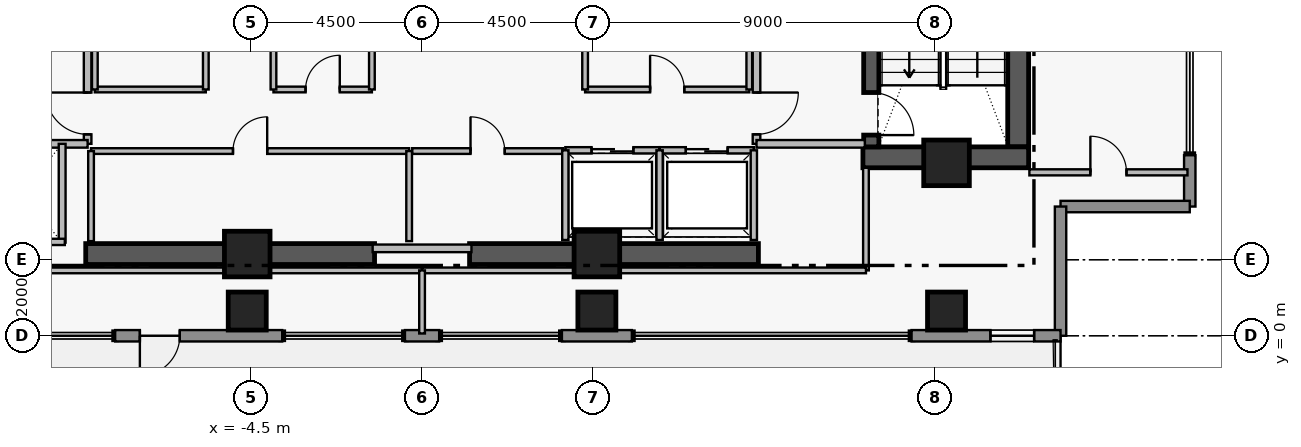
"""IFC4 building model, lengths in metres.
Left out: names, types, materials, properties, quantities, classifications, styles, units other than length and angle.
Written with IfcOpenShell. Run it as: python <this file> out.ifc"""

import sys

from ifc_helpers import new_model, si_unit, direction, frame, frame_2d, origin, origin_2d, place, context, subcontext, project, spatial, rectangle, extrude, element, fill, save


model = new_model("IFC4")
c1 = context("Model", 3, precision=1e-05, world=origin(), true_north=direction((0.0, 1.0)))
c2 = subcontext(c1, "Body", "Model", "MODEL_VIEW")
j1 = project(units=[si_unit("LENGTHUNIT", "METRE"), si_unit("PLANEANGLEUNIT", "RADIAN")], contexts=[c1])
p1 = place(None, origin())
s1 = spatial("IfcSite", under=j1, at=p1, CompositionType="ELEMENT")
p2 = place(p1, origin())
s2 = spatial("IfcBuilding", under=s1, at=p2, CompositionType="ELEMENT")
p3 = place(p2, frame((0.0, 0.0, 243.35)))
s3 = spatial("IfcBuildingStorey", under=s2, at=p3, CompositionType="ELEMENT", Elevation=243.35)
p4 = place(p3, frame((15.685, 4.97, 0.0), z_axis=(0.0, 0.0, 1.0), x_axis=(0.0, 1.0, 0.0)))
e1 = element("IfcWall", 1, at=p4, inside=s3, PredefinedType="SHEAR", context=c2, shape_type="SweptSolid", body=[
    extrude(rectangle(XDim=8.96, YDim=0.55, at=frame_2d((4.48, 0.0))), origin(), (0.0, 0.0, 1.0), 3.51),
])
p5 = place(p3, frame((11.6, 4.695, 0.0), z_axis=(0.0, 0.0, 1.0), x_axis=(1.0, 0.0, 0.0)))
e2 = element("IfcWall", 2, at=p5, inside=s3, PredefinedType="SHEAR", context=c2, shape_type="SweptSolid", body=[
    extrude(rectangle(XDim=4.36, YDim=0.55, at=frame_2d((2.18, 0.0))), origin(), (0.0, 0.0, 1.0), 3.51),
])
for number, where, z_axis, x_axis in (
    (3, (-8.85, 2.15, 0.0), (0.0, 0.0, 1.0), (1.0, 0.0, 0.0)),
    (4, (1.25, 2.15, 0.0), (0.0, 0.0, 1.0), (1.0, 0.0, 0.0)),
):
    element("IfcWall", number, at=place(p3, frame(where, z_axis=z_axis, x_axis=x_axis)), inside=s3, PredefinedType="SHEAR", context=c2, shape_type="SweptSolid", body=[
        extrude(rectangle(XDim=7.6, YDim=0.55, at=frame_2d((3.8, 0.0))), origin(), (0.0, 0.0, 1.0), 3.48),
    ])
p6 = place(p3, frame((11.82, 13.93, 0.0), z_axis=(0.0, 0.0, 1.0), x_axis=(0.0, -1.0, 0.0)))
e5 = element("IfcWall", 5, at=p6, inside=s3, PredefinedType="SHEAR", context=c2, shape_type="SweptSolid", body=[
    extrude(rectangle(XDim=8.96, YDim=0.4, at=frame_2d((4.48, 0.0))), origin(), (0.0, 0.0, 1.0), 3.51),
])
p7 = place(p6, frame((7.53, 0.0, 0.0)))
e6 = element("IfcOpeningElement", 6, at=p7, cuts=e5, PredefinedType="OPENING", context=c2, shape_type="SweptSolid", body=[
    extrude(rectangle(XDim=1.12, YDim=2.22, at=frame_2d((0.56, 1.11))), frame((0.0, 0.21, 0.0), z_axis=(0.0, -1.0, 0.0), x_axis=(1.0, 0.0, 0.0)), (0.0, 0.0, 1.0), 0.42),
])
for number, where, z_axis, x_axis in (
    (7, (-4.6, 2.15, 0.0), (0.0, 0.0, 1.0), (1.0, 0.0, 0.0)),
    (8, (4.6, 2.15, 0.0), (0.0, 0.0, 1.0), (1.0, 0.0, 0.0)),
    (9, (13.8, 4.55, 0.0), (0.0, 0.0, 1.0), (1.0, 0.0, 0.0)),
):
    element("IfcColumn", number, at=place(p3, frame(where, z_axis=z_axis, x_axis=x_axis)), inside=s3, PredefinedType="COLUMN", context=c2, shape_type="SweptSolid", body=[
        extrude(rectangle(XDim=1.2, YDim=1.2, at=origin_2d()), origin(), (0.0, 0.0, 1.0), 3.7),
    ])
for number, where, z_axis, x_axis in (
    (10, (-4.6, 0.65, 0.0), (0.0, 0.0, 1.0), (1.0, 0.0, 0.0)),
    (11, (4.6, 0.65, 0.0), (0.0, 0.0, 1.0), (1.0, 0.0, 0.0)),
    (12, (13.8, 0.65, 0.0), (0.0, 0.0, 1.0), (1.0, 0.0, 0.0)),
):
    element("IfcColumn", number, at=place(p3, frame(where, z_axis=z_axis, x_axis=x_axis)), inside=s3, PredefinedType="COLUMN", context=c2, shape_type="SweptSolid", body=[
        extrude(rectangle(XDim=1.0, YDim=1.0, at=origin_2d()), origin(), (0.0, 0.0, 1.0), 3.7),
    ])
p8 = place(p3, frame((20.2, 4.75, 0.0), z_axis=(0.0, 0.0, 1.0), x_axis=(0.0, -1.0, 0.0)))
e13 = element("IfcWall", 13, at=p8, inside=s3, PredefinedType="STANDARD", context=c2, shape_type="SweptSolid", body=[
    extrude(rectangle(XDim=1.35, YDim=0.3, at=frame_2d((0.675, 0.0))), origin(), (0.0, 0.0, 1.0), 3.48),
])
for number, where, z_axis, x_axis in (
    (14, (20.2, 3.4, 0.0), (0.0, 0.0, 1.0), (-1.0, 0.0, 0.0)),
    (15, (16.8, 3.4, 0.0), (0.0, 0.0, 1.0), (0.0, -1.0, 0.0)),
):
    element("IfcWall", number, at=place(p3, frame(where, z_axis=z_axis, x_axis=x_axis)), inside=s3, PredefinedType="STANDARD", context=c2, shape_type="SweptSolid", body=[
        extrude(rectangle(XDim=3.4, YDim=0.3, at=frame_2d((1.7, 0.0))), origin(), (0.0, 0.0, 1.0), 3.48),
    ])
p9 = place(p3, frame((16.8, 0.0, 0.0), z_axis=(0.0, 0.0, 1.0), x_axis=(-1.0, 0.0, 0.0)))
e16 = element("IfcWall", 16, at=p9, inside=s3, PredefinedType="STANDARD", context=c2, shape_type="SweptSolid", body=[
    extrude(rectangle(XDim=3.92, YDim=0.3, at=frame_2d((1.96, 0.0))), origin(), (0.0, 0.0, 1.0), 3.48),
])
p10 = place(p9, frame((0.695, 0.0, 0.95)))
e17 = element("IfcOpeningElement", 17, at=p10, cuts=e16, PredefinedType="OPENING", context=c2, shape_type="SweptSolid", body=[
    extrude(rectangle(XDim=1.15, YDim=1.55, at=frame_2d((0.575, 0.775))), frame((0.0, 0.16, 0.0), z_axis=(0.0, -1.0, 0.0), x_axis=(1.0, 0.0, 0.0)), (0.0, 0.0, 1.0), 0.32),
])
p11 = place(p3, frame((5.52, 0.0, 0.0), z_axis=(0.0, 0.0, 1.0), x_axis=(-1.0, 0.0, 0.0)))
e18 = element("IfcWall", 18, at=p11, inside=s3, PredefinedType="STANDARD", context=c2, shape_type="SweptSolid", body=[
    extrude(rectangle(XDim=1.84, YDim=0.3, at=frame_2d((0.92, 0.0))), origin(), (0.0, 0.0, 1.0), 3.48),
])
p12 = place(p3, frame((0.45, 0.0, 0.0), z_axis=(0.0, 0.0, 1.0), x_axis=(-1.0, 0.0, 0.0)))
e19 = element("IfcWall", 19, at=p12, inside=s3, PredefinedType="STANDARD", context=c2, shape_type="SweptSolid", body=[
    extrude(rectangle(XDim=0.9, YDim=0.3, at=frame_2d((0.45, 0.0))), origin(), (0.0, 0.0, 1.0), 3.48),
])
p13 = place(p3, frame((-3.68, 0.0, 0.0), z_axis=(0.0, 0.0, 1.0), x_axis=(-1.0, 0.0, 0.0)))
e20 = element("IfcWall", 20, at=p13, inside=s3, PredefinedType="STANDARD", context=c2, shape_type="SweptSolid", body=[
    extrude(rectangle(XDim=4.395, YDim=0.3, at=frame_2d((2.198, 0.0))), origin(), (0.0, 0.0, 1.0), 3.48),
])
p14 = place(p13, frame((2.695, 0.0, 0.0)))
e21 = element("IfcOpeningElement", 21, at=p14, cuts=e20, PredefinedType="OPENING", context=c2, shape_type="SweptSolid", body=[
    extrude(rectangle(XDim=1.05, YDim=2.2, at=frame_2d((0.525, 1.1))), frame((0.0, 0.16, 0.0), z_axis=(0.0, -1.0, 0.0), x_axis=(1.0, 0.0, 0.0)), (0.0, 0.0, 1.0), 0.32),
])
p15 = place(p3, frame((-8.8, 5.05, 0.0), z_axis=(0.0, 0.0, 1.0), x_axis=(0.0, 1.0, 0.0)))
e22 = element("IfcWall", 22, at=p15, inside=s3, PredefinedType="PARTITIONING", context=c2, shape_type="SweptSolid", body=[
    extrude(rectangle(XDim=6.1, YDim=0.2, at=frame_2d((3.05, 0.0))), origin(), (0.0, 0.0, 1.0), 3.48),
])
p16 = place(p15, frame((0.25, 0.0, 0.0)))
e23 = element("IfcOpeningElement", 23, at=p16, cuts=e22, PredefinedType="OPENING", context=c2, shape_type="SweptSolid", body=[
    extrude(rectangle(XDim=1.1, YDim=2.2, at=frame_2d((0.55, 1.1))), frame((0.0, 0.11, 0.0), z_axis=(0.0, -1.0, 0.0), x_axis=(1.0, 0.0, 0.0)), (0.0, 0.0, 1.0), 0.22),
])
p17 = place(p15, frame((3.85, 0.0, 0.0)))
e24 = element("IfcOpeningElement", 24, at=p17, cuts=e22, PredefinedType="OPENING", context=c2, shape_type="SweptSolid", body=[
    extrude(rectangle(XDim=1.1, YDim=2.2, at=frame_2d((0.55, 1.1))), frame((0.0, 0.11, 0.0), z_axis=(0.0, -1.0, 0.0), x_axis=(1.0, 0.0, 0.0)), (0.0, 0.0, 1.0), 0.22),
])
p18 = place(p3, frame((8.8, 11.15, 0.0), z_axis=(0.0, 0.0, 1.0), x_axis=(0.0, -1.0, 0.0)))
e25 = element("IfcWall", 25, at=p18, inside=s3, PredefinedType="PARTITIONING", context=c2, shape_type="SweptSolid", body=[
    extrude(rectangle(XDim=6.1, YDim=0.2, at=frame_2d((3.05, 0.0))), origin(), (0.0, 0.0, 1.0), 3.48),
])
p19 = place(p18, frame((1.15, 0.0, 0.0)))
e26 = element("IfcOpeningElement", 26, at=p19, cuts=e25, PredefinedType="OPENING", context=c2, shape_type="SweptSolid", body=[
    extrude(rectangle(XDim=1.1, YDim=2.2, at=frame_2d((0.55, 1.1))), frame((0.0, 0.11, 0.0), z_axis=(0.0, -1.0, 0.0), x_axis=(1.0, 0.0, 0.0)), (0.0, 0.0, 1.0), 0.22),
])
p20 = place(p18, frame((4.75, 0.0, 0.0)))
e27 = element("IfcOpeningElement", 27, at=p20, cuts=e25, PredefinedType="OPENING", context=c2, shape_type="SweptSolid", body=[
    extrude(rectangle(XDim=1.1, YDim=2.2, at=frame_2d((0.55, 1.1))), frame((0.0, 0.11, 0.0), z_axis=(0.0, -1.0, 0.0), x_axis=(1.0, 0.0, 0.0)), (0.0, 0.0, 1.0), 0.22),
])
p21 = place(p3, frame((3.77, 4.88, 0.0), z_axis=(0.0, 0.0, 1.0), x_axis=(1.0, 0.0, 0.0)))
e28 = element("IfcWall", 28, at=p21, inside=s3, PredefinedType="PARTITIONING", context=c2, shape_type="SweptSolid", body=[
    extrude(rectangle(XDim=2.48, YDim=0.165, at=frame_2d((1.24, 0.0))), origin(), (0.0, 0.0, 1.0), 3.48),
])
p22 = place(p21, frame((0.69, 0.0, 0.0)))
e29 = element("IfcOpeningElement", 29, at=p22, cuts=e28, PredefinedType="OPENING", context=c2, shape_type="SweptSolid", body=[
    extrude(rectangle(XDim=1.1, YDim=2.25, at=frame_2d((0.55, 1.125))), frame((0.0, 0.093, 0.0), z_axis=(0.0, -1.0, 0.0), x_axis=(1.0, 0.0, 0.0)), (0.0, 0.0, 1.0), 0.185),
])
p23 = place(p3, frame((6.25, 4.88, 0.0), z_axis=(0.0, 0.0, 1.0), x_axis=(1.0, 0.0, 0.0)))
e30 = element("IfcWall", 30, at=p23, inside=s3, PredefinedType="PARTITIONING", context=c2, shape_type="SweptSolid", body=[
    extrude(rectangle(XDim=2.48, YDim=0.165, at=frame_2d((1.24, 0.0))), origin(), (0.0, 0.0, 1.0), 3.48),
])
p24 = place(p23, frame((0.69, 0.0, 0.0)))
e31 = element("IfcOpeningElement", 31, at=p24, cuts=e30, PredefinedType="OPENING", context=c2, shape_type="SweptSolid", body=[
    extrude(rectangle(XDim=1.1, YDim=2.25, at=frame_2d((0.55, 1.125))), frame((0.0, 0.093, 0.0), z_axis=(0.0, -1.0, 0.0), x_axis=(1.0, 0.0, 0.0)), (0.0, 0.0, 1.0), 0.185),
])
p25 = place(p3, frame((-8.71, 4.86, 0.0), z_axis=(0.0, 0.0, 1.0), x_axis=(1.0, 0.0, 0.0)))
e32 = element("IfcWall", 32, at=p25, inside=s3, PredefinedType="PARTITIONING", context=c2, shape_type="SweptSolid", body=[
    extrude(rectangle(XDim=8.37, YDim=0.15, at=frame_2d((4.185, 0.0))), origin(), (0.0, 0.0, 1.0), 3.48),
])
p26 = place(p25, frame((3.735, 0.0, 0.0)))
e33 = element("IfcOpeningElement", 33, at=p26, cuts=e32, PredefinedType="OPENING", context=c2, shape_type="SweptSolid", body=[
    extrude(rectangle(XDim=0.9, YDim=2.15, at=frame_2d((0.45, 1.075))), frame((0.0, 0.085, 0.0), z_axis=(0.0, -1.0, 0.0), x_axis=(1.0, 0.0, 0.0)), (0.0, 0.0, 1.0), 0.17),
])
p27 = place(p3, frame((-0.26, 4.86, 0.0), z_axis=(0.0, 0.0, 1.0), x_axis=(1.0, 0.0, 0.0)))
e34 = element("IfcWall", 34, at=p27, inside=s3, PredefinedType="PARTITIONING", context=c2, shape_type="SweptSolid", body=[
    extrude(rectangle(XDim=3.97, YDim=0.15, at=frame_2d((1.985, 0.0))), origin(), (0.0, 0.0, 1.0), 3.48),
])
p28 = place(p27, frame((1.535, 0.0, 0.0)))
e35 = element("IfcOpeningElement", 35, at=p28, cuts=e34, PredefinedType="OPENING", context=c2, shape_type="SweptSolid", body=[
    extrude(rectangle(XDim=0.9, YDim=2.15, at=frame_2d((0.45, 1.075))), frame((0.0, 0.085, 0.0), z_axis=(0.0, -1.0, 0.0), x_axis=(1.0, 0.0, 0.0)), (0.0, 0.0, 1.0), 0.17),
])
p29 = place(p3, frame((-3.91, 6.48, 0.0), z_axis=(0.0, 0.0, 1.0), x_axis=(1.0, 0.0, 0.0)))
e36 = element("IfcWall", 36, at=p29, inside=s3, PredefinedType="PARTITIONING", context=c2, shape_type="SweptSolid", body=[
    extrude(rectangle(XDim=2.59, YDim=0.15, at=frame_2d((1.295, 0.0))), origin(), (0.0, 0.0, 1.0), 3.48),
])
p30 = place(p29, frame((0.845, 0.0, 0.0)))
e37 = element("IfcOpeningElement", 37, at=p30, cuts=e36, PredefinedType="OPENING", context=c2, shape_type="SweptSolid", body=[
    extrude(rectangle(XDim=0.9, YDim=2.15, at=frame_2d((0.45, 1.075))), frame((0.0, 0.085, 0.0), z_axis=(0.0, -1.0, 0.0), x_axis=(1.0, 0.0, 0.0)), (0.0, 0.0, 1.0), 0.17),
])
p31 = place(p3, frame((4.29, 6.48, 0.0), z_axis=(0.0, 0.0, 1.0), x_axis=(1.0, 0.0, 0.0)))
e38 = element("IfcWall", 38, at=p31, inside=s3, PredefinedType="PARTITIONING", context=c2, shape_type="SweptSolid", body=[
    extrude(rectangle(XDim=4.32, YDim=0.15, at=frame_2d((2.16, 0.0))), origin(), (0.0, 0.0, 1.0), 3.48),
])
p32 = place(p31, frame((1.71, 0.0, 0.0)))
e39 = element("IfcOpeningElement", 39, at=p32, cuts=e38, PredefinedType="OPENING", context=c2, shape_type="SweptSolid", body=[
    extrude(rectangle(XDim=0.9, YDim=2.15, at=frame_2d((0.45, 1.075))), frame((0.0, 0.085, 0.0), z_axis=(0.0, -1.0, 0.0), x_axis=(1.0, 0.0, 0.0)), (0.0, 0.0, 1.0), 0.17),
])
p33 = place(p3, frame((15.98, 4.3, 0.0), z_axis=(0.0, 0.0, 1.0), x_axis=(1.0, 0.0, 0.0)))
e40 = element("IfcWall", 40, at=p33, inside=s3, PredefinedType="PARTITIONING", context=c2, shape_type="SweptSolid", body=[
    extrude(rectangle(XDim=4.16, YDim=0.16, at=frame_2d((2.08, 0.0))), origin(), (0.0, 0.0, 1.0), 3.48),
])
p34 = place(p33, frame((1.605, 0.0, 0.0)))
e41 = element("IfcOpeningElement", 41, at=p34, cuts=e40, PredefinedType="OPENING", context=c2, shape_type="SweptSolid", body=[
    extrude(rectangle(XDim=0.95, YDim=2.15, at=frame_2d((0.475, 1.075))), frame((0.0, 0.09, 0.0), z_axis=(0.0, -1.0, 0.0), x_axis=(1.0, 0.0, 0.0)), (0.0, 0.0, 1.0), 0.18),
])
for number, where, z_axis, x_axis in (
    (42, (-11.65, 5.05, 0.0), (0.0, 0.0, 1.0), (1.0, 0.0, 0.0)),
    (43, (8.8, 5.05, 0.0), (0.0, 0.0, 1.0), (1.0, 0.0, 0.0)),
):
    element("IfcWall", number, at=place(p3, frame(where, z_axis=z_axis, x_axis=x_axis)), inside=s3, PredefinedType="PARTITIONING", context=c2, shape_type="SweptSolid", body=[
        extrude(rectangle(XDim=2.85, YDim=0.2, at=frame_2d((1.425, 0.0))), origin(), (0.0, 0.0, 1.0), 3.48),
    ])
for number, where, z_axis, x_axis in (
    (44, (3.77, 2.52, 0.0), (0.0, 0.0, 1.0), (0.0, 1.0, 0.0)),
    (45, (6.25, 2.52, 0.0), (0.0, 0.0, 1.0), (0.0, 1.0, 0.0)),
    (46, (8.73, 2.52, 0.0), (0.0, 0.0, 1.0), (0.0, 1.0, 0.0)),
):
    element("IfcWall", number, at=place(p3, frame(where, z_axis=z_axis, x_axis=x_axis)), inside=s3, PredefinedType="PARTITIONING", context=c2, shape_type="SweptSolid", body=[
        extrude(rectangle(XDim=2.36, YDim=0.165, at=frame_2d((1.18, 0.0))), origin(), (0.0, 0.0, 1.0), 3.48),
    ])
p35 = place(p3, frame((-1.3, 2.3, 0.0), z_axis=(0.0, 0.0, 1.0), x_axis=(1.0, 0.0, 0.0)))
e47 = element("IfcWall", 47, at=p35, inside=s3, PredefinedType="PARTITIONING", context=c2, shape_type="SweptSolid", body=[
    extrude(rectangle(XDim=2.6, YDim=0.2, at=frame_2d((1.3, 0.0))), origin(), (0.0, 0.0, 1.0), 2.38),
])
for number, where, z_axis, x_axis in (
    (48, (-8.71, 2.49, 0.0), (0.0, 0.0, 1.0), (0.0, 1.0, 0.0)),
    (49, (-0.34, 2.49, 0.0), (0.0, 0.0, 1.0), (0.0, 1.0, 0.0)),
):
    element("IfcWall", number, at=place(p3, frame(where, z_axis=z_axis, x_axis=x_axis)), inside=s3, PredefinedType="PARTITIONING", context=c2, shape_type="SweptSolid", body=[
        extrude(rectangle(XDim=2.37, YDim=0.15, at=frame_2d((1.185, 0.0))), origin(), (0.0, 0.0, 1.0), 3.48),
    ])
p36 = place(p3, frame((-9.47, 2.45, 0.0), z_axis=(0.0, 0.0, 1.0), x_axis=(0.0, 1.0, 0.0)))
e50 = element("IfcWall", 50, at=p36, inside=s3, PredefinedType="PARTITIONING", context=c2, shape_type="SweptSolid", body=[
    extrude(rectangle(XDim=2.6, YDim=0.18, at=frame_2d((1.3, 0.0))), origin(), (0.0, 0.0, 1.0), 3.48),
])
p37 = place(p3, frame((-11.71, 2.47, 0.0), z_axis=(0.0, 0.0, 1.0), x_axis=(1.0, 0.0, 0.0)))
e51 = element("IfcWall", 51, at=p37, inside=s3, PredefinedType="PARTITIONING", context=c2, shape_type="SweptSolid", body=[
    extrude(rectangle(XDim=2.31, YDim=0.165, at=frame_2d((1.155, 0.0))), origin(), (0.0, 0.0, 1.0), 2.38),
])
p38 = place(p3, frame((-8.61, 6.48, 0.0), z_axis=(0.0, 0.0, 1.0), x_axis=(1.0, 0.0, 0.0)))
e52 = element("IfcWall", 52, at=p38, inside=s3, PredefinedType="PARTITIONING", context=c2, shape_type="SweptSolid", body=[
    extrude(rectangle(XDim=2.92, YDim=0.15, at=frame_2d((1.46, 0.0))), origin(), (0.0, 0.0, 1.0), 3.48),
])
for number, where, z_axis, x_axis in (
    (53, (-8.61, 6.48, 0.0), (0.0, 0.0, 1.0), (0.0, 1.0, 0.0)),
    (54, (-5.69, 6.48, 0.0), (0.0, 0.0, 1.0), (0.0, 1.0, 0.0)),
    (55, (-3.91, 6.48, 0.0), (0.0, 0.0, 1.0), (0.0, 1.0, 0.0)),
    (56, (-1.32, 6.48, 0.0), (0.0, 0.0, 1.0), (0.0, 1.0, 0.0)),
    (57, (4.29, 6.48, 0.0), (0.0, 0.0, 1.0), (0.0, 1.0, 0.0)),
    (58, (8.61, 6.48, 0.0), (0.0, 0.0, 1.0), (0.0, 1.0, 0.0)),
):
    element("IfcWall", number, at=place(p3, frame(where, z_axis=z_axis, x_axis=x_axis)), inside=s3, PredefinedType="PARTITIONING", context=c2, shape_type="SweptSolid", body=[
        extrude(rectangle(XDim=2.24, YDim=0.15, at=frame_2d((1.12, 0.0))), origin(), (0.0, 0.0, 1.0), 3.48),
    ])
p39 = place(p3, frame((-11.68, 1.72, 0.0), z_axis=(0.0, 0.0, 1.0), x_axis=(1.0, 0.0, 0.0)))
e59 = element("IfcWall", 59, at=p39, inside=s3, PredefinedType="PARTITIONING", context=c2, shape_type="SweptSolid", body=[
    extrude(rectangle(XDim=11.68, YDim=0.15, at=frame_2d((5.84, 0.0))), origin(), (0.0, 0.0, 1.0), 2.38),
])
p40 = place(p3, frame((11.68, 1.72, 0.0), z_axis=(0.0, 0.0, 1.0), x_axis=(0.0, 1.0, 0.0)))
e60 = element("IfcWall", 60, at=p40, inside=s3, PredefinedType="PARTITIONING", context=c2, shape_type="SweptSolid", body=[
    extrude(rectangle(XDim=2.7, YDim=0.15, at=frame_2d((1.35, 0.0))), origin(), (0.0, 0.0, 1.0), 3.48),
])
p41 = place(p3, frame((0.0, 1.72, 0.0), z_axis=(0.0, 0.0, 1.0), x_axis=(1.0, 0.0, 0.0)))
e61 = element("IfcWall", 61, at=p41, inside=s3, PredefinedType="PARTITIONING", context=c2, shape_type="SweptSolid", body=[
    extrude(rectangle(XDim=11.68, YDim=0.15, at=frame_2d((5.84, 0.0))), origin(), (0.0, 0.0, 1.0), 2.38),
])
p42 = place(p3, frame((0.0, 0.06, 0.0), z_axis=(0.0, 0.0, 1.0), x_axis=(0.0, 1.0, 0.0)))
e62 = element("IfcWall", 62, at=p42, inside=s3, PredefinedType="PARTITIONING", context=c2, shape_type="SweptSolid", body=[
    extrude(rectangle(XDim=1.66, YDim=0.15, at=frame_2d((0.83, 0.0))), origin(), (0.0, 0.0, 1.0), 3.48),
])
p43 = place(p10, origin())
e63 = element("IfcWindow", 63, at=p43, inside=s3, PartitioningType="SINGLE_PANEL", PredefinedType="WINDOW", context=c2, shape_type="SweptSolid", body=[
    extrude(rectangle(XDim=1.15, YDim=1.55, at=frame_2d((0.575, 0.775))), frame((0.0, 0.03, 0.0), z_axis=(0.0, -1.0, 0.0), x_axis=(1.0, 0.0, 0.0)), (0.0, 0.0, 1.0), 0.06),
])
fill(e17, e63)
p44 = place(p14, origin())
e64 = element("IfcDoor", 64, at=p44, inside=s3, OperationType="SINGLE_SWING_RIGHT", PredefinedType="DOOR", context=c2, shape_type="SweptSolid", body=[
    extrude(rectangle(XDim=1.05, YDim=2.2, at=frame_2d((0.525, 1.1))), frame((0.0, 0.025, 0.0), z_axis=(0.0, -1.0, 0.0), x_axis=(1.0, 0.0, 0.0)), (0.0, 0.0, 1.0), 0.05),
])
fill(e21, e64)
p45 = place(p7, origin())
e65 = element("IfcDoor", 65, at=p45, inside=s3, OperationType="SINGLE_SWING_RIGHT", PredefinedType="DOOR", context=c2, shape_type="SweptSolid", body=[
    extrude(rectangle(XDim=1.12, YDim=2.22, at=frame_2d((0.56, 1.11))), frame((0.0, 0.025, 0.0), z_axis=(0.0, -1.0, 0.0), x_axis=(1.0, 0.0, 0.0)), (0.0, 0.0, 1.0), 0.05),
])
fill(e6, e65)
p46 = place(p16, origin())
e66 = element("IfcDoor", 66, at=p46, inside=s3, OperationType="SINGLE_SWING_RIGHT", PredefinedType="DOOR", context=c2, shape_type="SweptSolid", body=[
    extrude(rectangle(XDim=1.1, YDim=2.2, at=frame_2d((0.55, 1.1))), frame((0.0, 0.025, 0.0), z_axis=(0.0, -1.0, 0.0), x_axis=(1.0, 0.0, 0.0)), (0.0, 0.0, 1.0), 0.05),
])
fill(e23, e66)
p47 = place(p20, origin())
e67 = element("IfcDoor", 67, at=p47, inside=s3, OperationType="SINGLE_SWING_LEFT", PredefinedType="DOOR", context=c2, shape_type="SweptSolid", body=[
    extrude(rectangle(XDim=1.1, YDim=2.2, at=frame_2d((0.55, 1.1))), frame((0.0, 0.025, 0.0), z_axis=(0.0, -1.0, 0.0), x_axis=(1.0, 0.0, 0.0)), (0.0, 0.0, 1.0), 0.05),
])
fill(e27, e67)
p48 = place(p22, origin())
e68 = element("IfcDoor", 68, at=p48, inside=s3, OperationType="SLIDING_TO_LEFT", PredefinedType="DOOR", context=c2, shape_type="SweptSolid", body=[
    extrude(rectangle(XDim=1.1, YDim=2.25, at=frame_2d((0.55, 1.125))), frame((0.0, 0.025, 0.0), z_axis=(0.0, -1.0, 0.0), x_axis=(1.0, 0.0, 0.0)), (0.0, 0.0, 1.0), 0.05),
])
fill(e29, e68)
p49 = place(p24, origin())
e69 = element("IfcDoor", 69, at=p49, inside=s3, OperationType="SLIDING_TO_LEFT", PredefinedType="DOOR", context=c2, shape_type="SweptSolid", body=[
    extrude(rectangle(XDim=1.1, YDim=2.25, at=frame_2d((0.55, 1.125))), frame((0.0, 0.025, 0.0), z_axis=(0.0, -1.0, 0.0), x_axis=(1.0, 0.0, 0.0)), (0.0, 0.0, 1.0), 0.05),
])
fill(e31, e69)
p50 = place(p26, origin())
e70 = element("IfcDoor", 70, at=p50, inside=s3, OperationType="SINGLE_SWING_RIGHT", PredefinedType="DOOR", context=c2, shape_type="SweptSolid", body=[
    extrude(rectangle(XDim=0.9, YDim=2.15, at=frame_2d((0.45, 1.075))), frame((0.0, 0.025, 0.0), z_axis=(0.0, -1.0, 0.0), x_axis=(1.0, 0.0, 0.0)), (0.0, 0.0, 1.0), 0.05),
])
fill(e33, e70)
p51 = place(p28, origin())
e71 = element("IfcDoor", 71, at=p51, inside=s3, OperationType="SINGLE_SWING_LEFT", PredefinedType="DOOR", context=c2, shape_type="SweptSolid", body=[
    extrude(rectangle(XDim=0.9, YDim=2.15, at=frame_2d((0.45, 1.075))), frame((0.0, 0.025, 0.0), z_axis=(0.0, -1.0, 0.0), x_axis=(1.0, 0.0, 0.0)), (0.0, 0.0, 1.0), 0.05),
])
fill(e35, e71)
p52 = place(p30, origin())
e72 = element("IfcDoor", 72, at=p52, inside=s3, OperationType="SINGLE_SWING_RIGHT", PredefinedType="DOOR", context=c2, shape_type="SweptSolid", body=[
    extrude(rectangle(XDim=0.9, YDim=2.15, at=frame_2d((0.45, 1.075))), frame((0.0, 0.025, 0.0), z_axis=(0.0, -1.0, 0.0), x_axis=(1.0, 0.0, 0.0)), (0.0, 0.0, 1.0), 0.05),
])
fill(e37, e72)
p53 = place(p32, origin())
e73 = element("IfcDoor", 73, at=p53, inside=s3, OperationType="SINGLE_SWING_LEFT", PredefinedType="DOOR", context=c2, shape_type="SweptSolid", body=[
    extrude(rectangle(XDim=0.9, YDim=2.15, at=frame_2d((0.45, 1.075))), frame((0.0, 0.025, 0.0), z_axis=(0.0, -1.0, 0.0), x_axis=(1.0, 0.0, 0.0)), (0.0, 0.0, 1.0), 0.05),
])
fill(e39, e73)
p54 = place(p34, origin())
e74 = element("IfcDoor", 74, at=p54, inside=s3, OperationType="SINGLE_SWING_LEFT", PredefinedType="DOOR", context=c2, shape_type="SweptSolid", body=[
    extrude(rectangle(XDim=0.95, YDim=2.15, at=frame_2d((0.475, 1.075))), frame((0.0, 0.025, 0.0), z_axis=(0.0, -1.0, 0.0), x_axis=(1.0, 0.0, 0.0)), (0.0, 0.0, 1.0), 0.05),
])
fill(e41, e74)
save(model, sys.argv[1])
